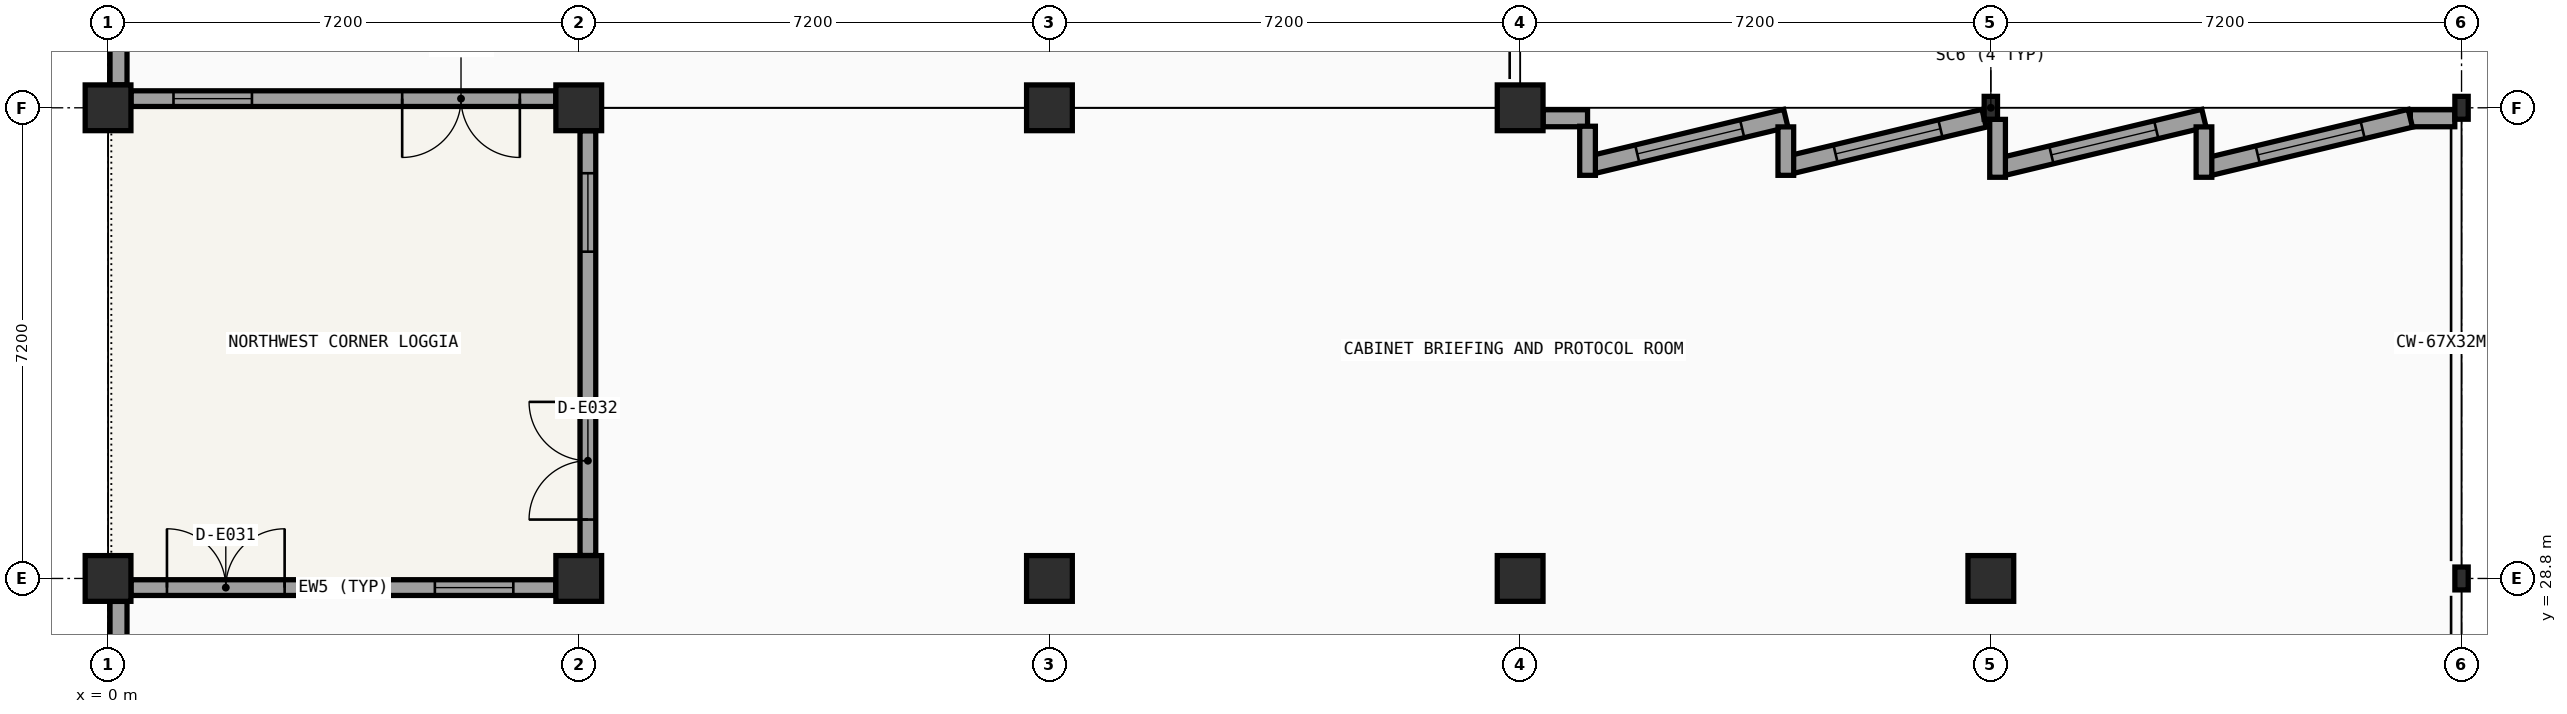
"""IFC4 building model, lengths in metres.
Left out: names, types, materials, properties, quantities, classifications, styles, units other than length and angle.
Written with IfcOpenShell. Run it as: python <this file> out.ifc"""

import sys

from ifc_helpers import new_model, si_unit, direction, frame, frame_2d, origin, origin_2d, place, context, subcontext, project, spatial, rectangle, i_section, extrude, element, fill, save


model = new_model("IFC4")
c1 = context("Model", 3, precision=1e-05, world=origin(), true_north=direction((0.0, 1.0)))
c2 = subcontext(c1, "Body", "Model", "MODEL_VIEW")
j1 = project(units=[si_unit("LENGTHUNIT", "METRE"), si_unit("PLANEANGLEUNIT", "RADIAN")], contexts=[c1])
p1 = place(None, origin())
s1 = spatial("IfcSite", under=j1, at=p1, CompositionType="ELEMENT")
p2 = place(p1, origin())
s2 = spatial("IfcBuilding", under=s1, at=p2, CompositionType="ELEMENT")
p3 = place(p2, frame((0.0, 0.0, 22.95)))
s3 = spatial("IfcBuildingStorey", under=s2, at=p3, CompositionType="ELEMENT", Elevation=22.95)
for number, where, z_axis, x_axis in (
    (1, (0.0, 28.8, 0.0), (0.0, 0.0, 1.0), (1.0, 0.0, 0.0)),
    (2, (0.0, 36.0, 0.0), (0.0, 0.0, 1.0), (1.0, 0.0, 0.0)),
    (3, (7.2, 28.8, 0.0), (0.0, 0.0, 1.0), (1.0, 0.0, 0.0)),
    (4, (7.2, 36.0, 0.0), (0.0, 0.0, 1.0), (1.0, 0.0, 0.0)),
    (5, (14.4, 28.8, 0.0), (0.0, 0.0, 1.0), (1.0, 0.0, 0.0)),
    (6, (14.4, 36.0, 0.0), (0.0, 0.0, 1.0), (1.0, 0.0, 0.0)),
    (7, (21.6, 28.8, 0.0), (0.0, 0.0, 1.0), (1.0, 0.0, 0.0)),
    (8, (21.6, 36.0, 0.0), (0.0, 0.0, 1.0), (1.0, 0.0, 0.0)),
    (9, (28.8, 28.8, 0.0), (0.0, 0.0, 1.0), (1.0, 0.0, 0.0)),
):
    element("IfcColumn", number, at=place(p3, frame(where, z_axis=z_axis, x_axis=x_axis)), inside=s3, PredefinedType="COLUMN", context=c2, shape_type="SweptSolid", body=[
        extrude(rectangle(XDim=0.7, YDim=0.7, at=origin_2d()), origin(), (0.0, 0.0, 1.0), 4.05),
    ])
for number, where, z_axis, x_axis in (
    (10, (28.8, 36.0, 0.0), (0.0, 0.0, 1.0), (1.0, 0.0, 0.0)),
    (11, (36.0, 28.8, 0.0), (0.0, 0.0, 1.0), (1.0, 0.0, 0.0)),
    (12, (36.0, 36.0, 0.0), (0.0, 0.0, 1.0), (1.0, 0.0, 0.0)),
):
    element("IfcColumn", number, at=place(p3, frame(where, z_axis=z_axis, x_axis=x_axis)), inside=s3, PredefinedType="COLUMN", context=c2, shape_type="SweptSolid", body=[
        extrude(i_section(OverallWidth=0.204, OverallDepth=0.35, WebThickness=0.009, FlangeThickness=0.015, FilletRadius=0.015, at=origin_2d()), origin(), (0.0, 0.0, 1.0), 4.05),
    ])
p4 = place(p3, frame((0.16, 27.769, 0.0), z_axis=(0.0, 0.0, 1.0), x_axis=(0.0, 1.0, 0.0)))
e13 = element("IfcWall", 13, at=p4, inside=s3, PredefinedType="SOLIDWALL", context=c2, shape_type="SweptSolid", body=[
    extrude(rectangle(XDim=0.68, YDim=0.26, at=frame_2d((0.34, 0.0))), origin(), (0.0, 0.0, 1.0), 3.216),
])
p5 = place(p3, frame((0.351, 28.66, 0.0), z_axis=(0.0, 0.0, 1.0), x_axis=(1.0, 0.0, 0.0)))
e14 = element("IfcWall", 14, at=p5, inside=s3, PredefinedType="SOLIDWALL", context=c2, shape_type="SweptSolid", body=[
    extrude(rectangle(XDim=6.498, YDim=0.24, at=frame_2d((3.249, 0.0))), origin(), (0.0, 0.0, 1.0), 3.206),
])
p6 = place(p5, frame((0.55, 0.0, 0.0)))
e15 = element("IfcOpeningElement", 15, at=p6, cuts=e14, PredefinedType="OPENING", context=c2, shape_type="SweptSolid", body=[
    extrude(rectangle(XDim=1.8, YDim=2.15, at=frame_2d((0.9, 1.075))), frame((0.0, 0.13, 0.0), z_axis=(0.0, -1.0, 0.0), x_axis=(1.0, 0.0, 0.0)), (0.0, 0.0, 1.0), 0.26),
])
p7 = place(p5, frame((4.648, 0.0, 0.85)))
e16 = element("IfcOpeningElement", 16, at=p7, cuts=e14, PredefinedType="OPENING", context=c2, shape_type="SweptSolid", body=[
    extrude(rectangle(XDim=1.2, YDim=1.95, at=frame_2d((0.6, 0.975))), frame((0.0, 0.13, 0.0), z_axis=(0.0, -1.0, 0.0), x_axis=(1.0, 0.0, 0.0)), (0.0, 0.0, 1.0), 0.26),
])
p8 = place(p3, frame((7.34, 29.151, 0.0), z_axis=(0.0, 0.0, 1.0), x_axis=(0.0, 1.0, 0.0)))
e17 = element("IfcWall", 17, at=p8, inside=s3, PredefinedType="SOLIDWALL", context=c2, shape_type="SweptSolid", body=[
    extrude(rectangle(XDim=6.498, YDim=0.24, at=frame_2d((3.249, 0.0))), origin(), (0.0, 0.0, 1.0), 3.206),
])
p9 = place(p8, frame((0.55, 0.0, 0.0)))
e18 = element("IfcOpeningElement", 18, at=p9, cuts=e17, PredefinedType="OPENING", context=c2, shape_type="SweptSolid", body=[
    extrude(rectangle(XDim=1.8, YDim=2.15, at=frame_2d((0.9, 1.075))), frame((0.0, 0.13, 0.0), z_axis=(0.0, -1.0, 0.0), x_axis=(1.0, 0.0, 0.0)), (0.0, 0.0, 1.0), 0.26),
])
p10 = place(p8, frame((4.648, 0.0, 0.85)))
e19 = element("IfcOpeningElement", 19, at=p10, cuts=e17, PredefinedType="OPENING", context=c2, shape_type="SweptSolid", body=[
    extrude(rectangle(XDim=1.2, YDim=1.95, at=frame_2d((0.6, 0.975))), frame((0.0, 0.13, 0.0), z_axis=(0.0, -1.0, 0.0), x_axis=(1.0, 0.0, 0.0)), (0.0, 0.0, 1.0), 0.26),
])
p11 = place(p3, frame((6.849, 36.14, 0.0), z_axis=(0.0, 0.0, 1.0), x_axis=(-1.0, 0.0, 0.0)))
e20 = element("IfcWall", 20, at=p11, inside=s3, PredefinedType="SOLIDWALL", context=c2, shape_type="SweptSolid", body=[
    extrude(rectangle(XDim=6.498, YDim=0.24, at=frame_2d((3.249, 0.0))), origin(), (0.0, 0.0, 1.0), 3.206),
])
p12 = place(p11, frame((0.55, 0.0, 0.0)))
e21 = element("IfcOpeningElement", 21, at=p12, cuts=e20, PredefinedType="OPENING", context=c2, shape_type="SweptSolid", body=[
    extrude(rectangle(XDim=1.8, YDim=2.15, at=frame_2d((0.9, 1.075))), frame((0.0, 0.13, 0.0), z_axis=(0.0, -1.0, 0.0), x_axis=(1.0, 0.0, 0.0)), (0.0, 0.0, 1.0), 0.26),
])
p13 = place(p11, frame((4.648, 0.0, 0.85)))
e22 = element("IfcOpeningElement", 22, at=p13, cuts=e20, PredefinedType="OPENING", context=c2, shape_type="SweptSolid", body=[
    extrude(rectangle(XDim=1.2, YDim=1.95, at=frame_2d((0.6, 0.975))), frame((0.0, 0.13, 0.0), z_axis=(0.0, -1.0, 0.0), x_axis=(1.0, 0.0, 0.0)), (0.0, 0.0, 1.0), 0.26),
])
p14 = place(p3, frame((0.16, 36.351, 0.0), z_axis=(0.0, 0.0, 1.0), x_axis=(0.0, 1.0, 0.0)))
e23 = element("IfcWall", 23, at=p14, inside=s3, PredefinedType="SOLIDWALL", context=c2, shape_type="SweptSolid", body=[
    extrude(rectangle(XDim=0.68, YDim=0.26, at=frame_2d((0.34, 0.0))), origin(), (0.0, 0.0, 1.0), 3.216),
])
p15 = place(p3, frame((21.951, 35.84, 0.0), z_axis=(0.0, 0.0, 1.0), x_axis=(1.0, 0.0, 0.0)))
e24 = element("IfcWall", 24, at=p15, inside=s3, PredefinedType="SOLIDWALL", context=c2, shape_type="SweptSolid", body=[
    extrude(rectangle(XDim=0.68, YDim=0.26, at=frame_2d((0.34, 0.0))), origin(), (0.0, 0.0, 1.0), 3.216),
])
p16 = place(p3, frame((22.723, 35.134, 0.0), z_axis=(0.0, 0.0, 1.0), x_axis=(0.972365314325, 0.233464548695, 0.0)))
e25 = element("IfcWall", 25, at=p16, inside=s3, PredefinedType="SOLIDWALL", context=c2, shape_type="SweptSolid", body=[
    extrude(rectangle(XDim=3.024, YDim=0.28, at=frame_2d((1.512, 0.0))), origin(), (0.0, 0.0, 1.0), 3.216),
])
p17 = place(p16, frame((0.687, 0.0, 0.8)))
e26 = element("IfcOpeningElement", 26, at=p17, cuts=e25, PredefinedType="OPENING", context=c2, shape_type="SweptSolid", body=[
    extrude(rectangle(XDim=1.65, YDim=1.9, at=frame_2d((0.825, 0.95))), frame((0.0, 0.15, 0.0), z_axis=(0.0, -1.0, 0.0), x_axis=(1.0, 0.0, 0.0)), (0.0, 0.0, 1.0), 0.3),
])
p18 = place(p3, frame((22.631, 34.967, 0.0), z_axis=(0.0, 0.0, 1.0), x_axis=(0.0, 1.0, 0.0)))
e27 = element("IfcWall", 27, at=p18, inside=s3, PredefinedType="SOLIDWALL", context=c2, shape_type="SweptSolid", body=[
    extrude(rectangle(XDim=0.751, YDim=0.24, at=frame_2d((0.375, 0.0))), origin(), (0.0, 0.0, 1.0), 3.8),
])
p19 = place(p3, frame((25.756, 35.134, 0.0), z_axis=(0.0, 0.0, 1.0), x_axis=(0.972365314325, 0.233464548695, 0.0)))
e28 = element("IfcWall", 28, at=p19, inside=s3, PredefinedType="SOLIDWALL", context=c2, shape_type="SweptSolid", body=[
    extrude(rectangle(XDim=3.024, YDim=0.28, at=frame_2d((1.512, 0.0))), origin(), (0.0, 0.0, 1.0), 3.216),
])
p20 = place(p19, frame((0.687, 0.0, 0.8)))
e29 = element("IfcOpeningElement", 29, at=p20, cuts=e28, PredefinedType="OPENING", context=c2, shape_type="SweptSolid", body=[
    extrude(rectangle(XDim=1.65, YDim=1.9, at=frame_2d((0.825, 0.95))), frame((0.0, 0.15, 0.0), z_axis=(0.0, -1.0, 0.0), x_axis=(1.0, 0.0, 0.0)), (0.0, 0.0, 1.0), 0.3),
])
p21 = place(p3, frame((25.664, 34.967, 0.0), z_axis=(0.0, 0.0, 1.0), x_axis=(0.0, 1.0, 0.0)))
e30 = element("IfcWall", 30, at=p21, inside=s3, PredefinedType="SOLIDWALL", context=c2, shape_type="SweptSolid", body=[
    extrude(rectangle(XDim=0.741, YDim=0.24, at=frame_2d((0.371, 0.0))), origin(), (0.0, 0.0, 1.0), 3.8),
])
p22 = place(p3, frame((35.217, 35.84, 0.0), z_axis=(0.0, 0.0, 1.0), x_axis=(1.0, 0.0, 0.0)))
e31 = element("IfcWall", 31, at=p22, inside=s3, PredefinedType="SOLIDWALL", context=c2, shape_type="SweptSolid", body=[
    extrude(rectangle(XDim=0.68, YDim=0.26, at=frame_2d((0.34, 0.0))), origin(), (0.0, 0.0, 1.0), 3.216),
])
p23 = place(p3, frame((28.995, 35.104, 0.0), z_axis=(0.0, 0.0, 1.0), x_axis=(0.972364797516, 0.233466701164, 0.0)))
e32 = element("IfcWall", 32, at=p23, inside=s3, PredefinedType="SOLIDWALL", context=c2, shape_type="SweptSolid", body=[
    extrude(rectangle(XDim=3.152, YDim=0.28, at=frame_2d((1.576, 0.0))), origin(), (0.0, 0.0, 1.0), 3.206),
])
p24 = place(p23, frame((0.751, 0.0, 0.8)))
e33 = element("IfcOpeningElement", 33, at=p24, cuts=e32, PredefinedType="OPENING", context=c2, shape_type="SweptSolid", body=[
    extrude(rectangle(XDim=1.65, YDim=1.9, at=frame_2d((0.825, 0.95))), frame((0.0, 0.15, 0.0), z_axis=(0.0, -1.0, 0.0), x_axis=(1.0, 0.0, 0.0)), (0.0, 0.0, 1.0), 0.3),
])
p25 = place(p3, frame((28.903, 34.937, 0.0), z_axis=(0.0, 0.0, 1.0), x_axis=(0.0, 1.0, 0.0)))
e34 = element("IfcWall", 34, at=p25, inside=s3, PredefinedType="SOLIDWALL", context=c2, shape_type="SweptSolid", body=[
    extrude(rectangle(XDim=0.886, YDim=0.24, at=frame_2d((0.443, 0.0))), origin(), (0.0, 0.0, 1.0), 3.206),
])
p26 = place(p3, frame((32.152, 35.104, 0.0), z_axis=(0.0, 0.0, 1.0), x_axis=(0.972364797516, 0.233466701164, 0.0)))
e35 = element("IfcWall", 35, at=p26, inside=s3, PredefinedType="SOLIDWALL", context=c2, shape_type="SweptSolid", body=[
    extrude(rectangle(XDim=3.152, YDim=0.28, at=frame_2d((1.576, 0.0))), origin(), (0.0, 0.0, 1.0), 3.216),
])
p27 = place(p26, frame((0.751, 0.0, 0.8)))
e36 = element("IfcOpeningElement", 36, at=p27, cuts=e35, PredefinedType="OPENING", context=c2, shape_type="SweptSolid", body=[
    extrude(rectangle(XDim=1.65, YDim=1.9, at=frame_2d((0.825, 0.95))), frame((0.0, 0.15, 0.0), z_axis=(0.0, -1.0, 0.0), x_axis=(1.0, 0.0, 0.0)), (0.0, 0.0, 1.0), 0.3),
])
p28 = place(p3, frame((32.06, 34.937, 0.0), z_axis=(0.0, 0.0, 1.0), x_axis=(0.0, 1.0, 0.0)))
e37 = element("IfcWall", 37, at=p28, inside=s3, PredefinedType="SOLIDWALL", context=c2, shape_type="SweptSolid", body=[
    extrude(rectangle(XDim=0.771, YDim=0.24, at=frame_2d((0.385, 0.0))), origin(), (0.0, 0.0, 1.0), 3.8),
])
p29 = place(p6, origin())
e38 = element("IfcDoor", 38, at=p29, inside=s3, OperationType="DOUBLE_DOOR_SINGLE_SWING", PredefinedType="DOOR", context=c2, shape_type="SweptSolid", body=[
    extrude(rectangle(XDim=1.8, YDim=2.15, at=frame_2d((0.9, 1.075))), frame((0.0, 0.025, 0.0), z_axis=(0.0, -1.0, 0.0), x_axis=(1.0, 0.0, 0.0)), (0.0, 0.0, 1.0), 0.05),
])
fill(e15, e38)
p30 = place(p7, origin())
e39 = element("IfcWindow", 39, at=p30, inside=s3, PartitioningType="SINGLE_PANEL", PredefinedType="WINDOW", context=c2, shape_type="SweptSolid", body=[
    extrude(rectangle(XDim=1.2, YDim=1.95, at=frame_2d((0.6, 0.975))), frame((0.0, 0.03, 0.0), z_axis=(0.0, -1.0, 0.0), x_axis=(1.0, 0.0, 0.0)), (0.0, 0.0, 1.0), 0.06),
])
fill(e16, e39)
p31 = place(p9, origin())
e40 = element("IfcDoor", 40, at=p31, inside=s3, OperationType="DOUBLE_DOOR_SINGLE_SWING", PredefinedType="DOOR", context=c2, shape_type="SweptSolid", body=[
    extrude(rectangle(XDim=1.8, YDim=2.15, at=frame_2d((0.9, 1.075))), frame((0.0, 0.025, 0.0), z_axis=(0.0, -1.0, 0.0), x_axis=(1.0, 0.0, 0.0)), (0.0, 0.0, 1.0), 0.05),
])
fill(e18, e40)
p32 = place(p10, origin())
e41 = element("IfcWindow", 41, at=p32, inside=s3, PartitioningType="SINGLE_PANEL", PredefinedType="WINDOW", context=c2, shape_type="SweptSolid", body=[
    extrude(rectangle(XDim=1.2, YDim=1.95, at=frame_2d((0.6, 0.975))), frame((0.0, 0.03, 0.0), z_axis=(0.0, -1.0, 0.0), x_axis=(1.0, 0.0, 0.0)), (0.0, 0.0, 1.0), 0.06),
])
fill(e19, e41)
p33 = place(p12, origin())
e42 = element("IfcDoor", 42, at=p33, inside=s3, OperationType="DOUBLE_DOOR_SINGLE_SWING", PredefinedType="DOOR", context=c2, shape_type="SweptSolid", body=[
    extrude(rectangle(XDim=1.8, YDim=2.15, at=frame_2d((0.9, 1.075))), frame((0.0, 0.025, 0.0), z_axis=(0.0, -1.0, 0.0), x_axis=(1.0, 0.0, 0.0)), (0.0, 0.0, 1.0), 0.05),
])
fill(e21, e42)
p34 = place(p13, origin())
e43 = element("IfcWindow", 43, at=p34, inside=s3, PartitioningType="SINGLE_PANEL", PredefinedType="WINDOW", context=c2, shape_type="SweptSolid", body=[
    extrude(rectangle(XDim=1.2, YDim=1.95, at=frame_2d((0.6, 0.975))), frame((0.0, 0.03, 0.0), z_axis=(0.0, -1.0, 0.0), x_axis=(1.0, 0.0, 0.0)), (0.0, 0.0, 1.0), 0.06),
])
fill(e22, e43)
p35 = place(p17, origin())
e44 = element("IfcWindow", 44, at=p35, inside=s3, PartitioningType="SINGLE_PANEL", PredefinedType="WINDOW", context=c2, shape_type="SweptSolid", body=[
    extrude(rectangle(XDim=1.65, YDim=1.9, at=frame_2d((0.825, 0.95))), frame((0.0, 0.03, 0.0), z_axis=(0.0, -1.0, 0.0), x_axis=(1.0, 0.0, 0.0)), (0.0, 0.0, 1.0), 0.06),
])
fill(e26, e44)
p36 = place(p20, origin())
e45 = element("IfcWindow", 45, at=p36, inside=s3, PartitioningType="SINGLE_PANEL", PredefinedType="WINDOW", context=c2, shape_type="SweptSolid", body=[
    extrude(rectangle(XDim=1.65, YDim=1.9, at=frame_2d((0.825, 0.95))), frame((0.0, 0.03, 0.0), z_axis=(0.0, -1.0, 0.0), x_axis=(1.0, 0.0, 0.0)), (0.0, 0.0, 1.0), 0.06),
])
fill(e29, e45)
p37 = place(p24, origin())
e46 = element("IfcWindow", 46, at=p37, inside=s3, PartitioningType="SINGLE_PANEL", PredefinedType="WINDOW", context=c2, shape_type="SweptSolid", body=[
    extrude(rectangle(XDim=1.65, YDim=1.9, at=frame_2d((0.825, 0.95))), frame((0.0, 0.03, 0.0), z_axis=(0.0, -1.0, 0.0), x_axis=(1.0, 0.0, 0.0)), (0.0, 0.0, 1.0), 0.06),
])
fill(e33, e46)
p38 = place(p27, origin())
e47 = element("IfcWindow", 47, at=p38, inside=s3, PartitioningType="SINGLE_PANEL", PredefinedType="WINDOW", context=c2, shape_type="SweptSolid", body=[
    extrude(rectangle(XDim=1.65, YDim=1.9, at=frame_2d((0.825, 0.95))), frame((0.0, 0.03, 0.0), z_axis=(0.0, -1.0, 0.0), x_axis=(1.0, 0.0, 0.0)), (0.0, 0.0, 1.0), 0.06),
])
fill(e36, e47)
save(model, sys.argv[1])
